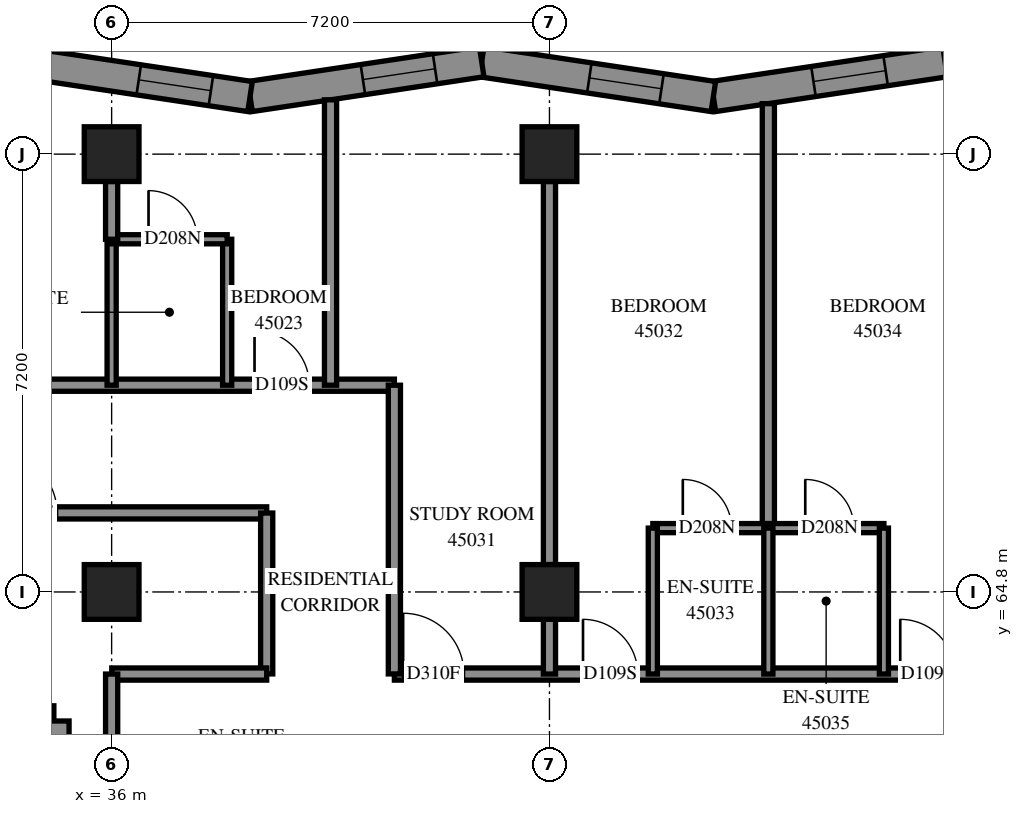
"""IFC4 building model, lengths in metres.
Left out: names, types, materials, properties, quantities, classifications, styles, units other than length and angle.
Written with IfcOpenShell. Run it as: python <this file> out.ifc"""

import sys

from ifc_helpers import new_model, si_unit, direction, frame, frame_2d, origin, origin_2d, place, context, subcontext, project, spatial, polyline, rectangle, outline, extrude, element, fill, save


model = new_model("IFC4")
c1 = context("Model", 3, precision=1e-05, world=origin(), true_north=direction((0.0, 1.0)))
c2 = subcontext(c1, "Body", "Model", "MODEL_VIEW")
j1 = project(units=[si_unit("LENGTHUNIT", "METRE"), si_unit("PLANEANGLEUNIT", "RADIAN")], contexts=[c1])
p1 = place(None, origin())
s1 = spatial("IfcSite", under=j1, at=p1, CompositionType="ELEMENT")
p2 = place(p1, origin())
s2 = spatial("IfcBuilding", under=s1, at=p2, CompositionType="ELEMENT")
p3 = place(p2, frame((0.0, 0.0, 166.0)))
s3 = spatial("IfcBuildingStorey", under=s2, at=p3, CompositionType="ELEMENT", Elevation=166.0)
for number, where, z_axis, x_axis in (
    (1, (36.0, 64.8, 0.0), (0.0, 0.0, 1.0), (1.0, 0.0, 0.0)),
    (2, (36.0, 72.0, 0.0), (0.0, 0.0, 1.0), (1.0, 0.0, 0.0)),
    (3, (43.2, 64.8, 0.0), (0.0, 0.0, 1.0), (1.0, 0.0, 0.0)),
    (4, (43.2, 72.0, 0.0), (0.0, 0.0, 1.0), (1.0, 0.0, 0.0)),
):
    element("IfcColumn", number, at=place(p3, frame(where, z_axis=z_axis, x_axis=x_axis)), inside=s3, PredefinedType="COLUMN", context=c2, shape_type="SweptSolid", body=[
        extrude(rectangle(XDim=0.9, YDim=0.9, at=origin_2d()), origin(), (0.0, 0.0, 1.0), 3.1),
    ])
p4 = place(p3, frame((49.705, 73.519, 0.0), z_axis=(0.0, 0.0, 1.0), x_axis=(-0.9889155896, -0.1484788086, 0.0)))
e5 = element("IfcWall", 5, at=p4, inside=s3, PredefinedType="SOLIDWALL", context=c2, shape_type="SweptSolid", body=[
    extrude(outline(polyline([(-0.037, -0.25), (3.815, -0.25), (3.89, 0.25), (0.037, 0.25), (-0.037, -0.25)])), origin(), (0.0, 0.0, 1.0), 3.1),
])
p5 = place(p4, frame((0.988, 0.0, 0.45)))
e6 = element("IfcOpeningElement", 6, at=p5, cuts=e5, PredefinedType="OPENING", context=c2, shape_type="SweptSolid", body=[
    extrude(rectangle(XDim=1.2, YDim=2.5, at=frame_2d((0.6, 1.25))), frame((0.0, 0.26, 0.0), z_axis=(0.0, -1.0, 0.0), x_axis=(1.0, 0.0, 0.0)), (0.0, 0.0, 1.0), 0.52),
])
p6 = place(p3, frame((45.896, 72.947, 0.0), z_axis=(0.0, 0.0, 1.0), x_axis=(-0.9889150173, 0.1484826202, 0.0)))
e7 = element("IfcWall", 7, at=p6, inside=s3, PredefinedType="SOLIDWALL", context=c2, shape_type="SweptSolid", body=[
    extrude(outline(polyline([(0.037, -0.25), (3.89, -0.25), (3.815, 0.25), (-0.037, 0.25), (0.037, -0.25)])), origin(), (0.0, 0.0, 1.0), 3.1),
])
p7 = place(p6, frame((0.863, 0.0, 0.45)))
e8 = element("IfcOpeningElement", 8, at=p7, cuts=e7, PredefinedType="OPENING", context=c2, shape_type="SweptSolid", body=[
    extrude(rectangle(XDim=1.2, YDim=2.5, at=frame_2d((0.6, 1.25))), frame((0.0, 0.26, 0.0), z_axis=(0.0, -1.0, 0.0), x_axis=(1.0, 0.0, 0.0)), (0.0, 0.0, 1.0), 0.52),
])
p8 = place(p3, frame((42.086, 73.519, 0.0), z_axis=(0.0, 0.0, 1.0), x_axis=(-0.9889155896, -0.1484788086, 0.0)))
e9 = element("IfcWall", 9, at=p8, inside=s3, PredefinedType="SOLIDWALL", context=c2, shape_type="SweptSolid", body=[
    extrude(outline(polyline([(-0.037, -0.25), (3.815, -0.25), (3.89, 0.25), (0.037, 0.25), (-0.037, -0.25)])), origin(), (0.0, 0.0, 1.0), 3.1),
])
p9 = place(p8, frame((0.776, 0.0, 0.45)))
e10 = element("IfcOpeningElement", 10, at=p9, cuts=e9, PredefinedType="OPENING", context=c2, shape_type="SweptSolid", body=[
    extrude(rectangle(XDim=1.2, YDim=2.5, at=frame_2d((0.6, 1.25))), frame((0.0, 0.26, 0.0), z_axis=(0.0, -1.0, 0.0), x_axis=(1.0, 0.0, 0.0)), (0.0, 0.0, 1.0), 0.52),
])
p10 = place(p3, frame((38.276, 72.947, 0.0), z_axis=(0.0, 0.0, 1.0), x_axis=(-0.9889155896, 0.1484788086, 0.0)))
e11 = element("IfcWall", 11, at=p10, inside=s3, PredefinedType="SOLIDWALL", context=c2, shape_type="SweptSolid", body=[
    extrude(outline(polyline([(0.037, -0.25), (3.89, -0.25), (3.815, 0.25), (-0.037, 0.25), (0.037, -0.25)])), origin(), (0.0, 0.0, 1.0), 3.1),
])
p11 = place(p10, frame((0.651, 0.0, 0.45)))
e12 = element("IfcOpeningElement", 12, at=p11, cuts=e11, PredefinedType="OPENING", context=c2, shape_type="SweptSolid", body=[
    extrude(rectangle(XDim=1.2, YDim=2.5, at=frame_2d((0.6, 1.25))), frame((0.0, 0.26, 0.0), z_axis=(0.0, -1.0, 0.0), x_axis=(1.0, 0.0, 0.0)), (0.0, 0.0, 1.0), 0.52),
])
p12 = place(p3, frame((19.478, 62.678, 0.0), z_axis=(0.0, 0.0, 1.0), x_axis=(1.0, 0.0, 0.0)))
e13 = element("IfcWall", 13, at=p12, inside=s3, PredefinedType="SOLIDWALL", context=c2, shape_type="SweptSolid", body=[
    extrude(outline(polyline([(-0.25, -0.25), (15.322, -0.25), (15.822, 0.25), (0.25, 0.25), (-0.25, -0.25)])), origin(), (0.0, 0.0, 1.0), 3.1),
])
p13 = place(p12, frame((2.522, 0.0, 0.45)))
e14 = element("IfcOpeningElement", 14, at=p13, cuts=e13, PredefinedType="OPENING", context=c2, shape_type="SweptSolid", body=[
    extrude(rectangle(XDim=2.8, YDim=2.5, at=frame_2d((1.4, 1.25))), frame((0.0, 0.26, 0.0), z_axis=(0.0, -1.0, 0.0), x_axis=(1.0, 0.0, 0.0)), (0.0, 0.0, 1.0), 0.52),
])
p14 = place(p12, frame((6.122, 0.0, 0.45)))
e15 = element("IfcOpeningElement", 15, at=p14, cuts=e13, PredefinedType="OPENING", context=c2, shape_type="SweptSolid", body=[
    extrude(rectangle(XDim=2.8, YDim=2.5, at=frame_2d((1.4, 1.25))), frame((0.0, 0.26, 0.0), z_axis=(0.0, -1.0, 0.0), x_axis=(1.0, 0.0, 0.0)), (0.0, 0.0, 1.0), 0.52),
])
p15 = place(p12, frame((0.686, 0.0, 0.45)))
e16 = element("IfcOpeningElement", 16, at=p15, cuts=e13, PredefinedType="OPENING", context=c2, shape_type="SweptSolid", body=[
    extrude(rectangle(XDim=1.2, YDim=2.5, at=frame_2d((0.6, 1.25))), frame((0.0, 0.26, 0.0), z_axis=(0.0, -1.0, 0.0), x_axis=(1.0, 0.0, 0.0)), (0.0, 0.0, 1.0), 0.52),
])
p16 = place(p12, frame((13.547, 0.0, 0.45)))
e17 = element("IfcOpeningElement", 17, at=p16, cuts=e13, PredefinedType="OPENING", context=c2, shape_type="SweptSolid", body=[
    extrude(rectangle(XDim=1.2, YDim=2.5, at=frame_2d((0.6, 1.25))), frame((0.0, 0.26, 0.0), z_axis=(0.0, -1.0, 0.0), x_axis=(1.0, 0.0, 0.0)), (0.0, 0.0, 1.0), 0.52),
])
p17 = place(p12, frame((9.547, 0.0, 0.45)))
e18 = element("IfcOpeningElement", 18, at=p17, cuts=e13, PredefinedType="OPENING", context=c2, shape_type="SweptSolid", body=[
    extrude(rectangle(XDim=1.3, YDim=2.5, at=frame_2d((0.65, 1.25))), frame((0.0, 0.26, 0.0), z_axis=(0.0, -1.0, 0.0), x_axis=(1.0, 0.0, 0.0)), (0.0, 0.0, 1.0), 0.52),
])
p18 = place(p12, frame((11.197, 0.0, 0.45)))
e19 = element("IfcOpeningElement", 19, at=p18, cuts=e13, PredefinedType="OPENING", context=c2, shape_type="SweptSolid", body=[
    extrude(rectangle(XDim=1.0, YDim=2.5, at=frame_2d((0.5, 1.25))), frame((0.0, 0.26, 0.0), z_axis=(0.0, -1.0, 0.0), x_axis=(1.0, 0.0, 0.0)), (0.0, 0.0, 1.0), 0.52),
])
p19 = place(p3, frame((35.05, 62.678, 0.0), z_axis=(0.0, 0.0, 1.0), x_axis=(0.0, -1.0, 0.0)))
e20 = element("IfcWall", 20, at=p19, inside=s3, PredefinedType="SOLIDWALL", context=c2, shape_type="SweptSolid", body=[
    extrude(outline(polyline([(0.25, -0.25), (6.278, -0.25), (5.778, 0.25), (-0.25, 0.25), (0.25, -0.25)])), origin(), (0.0, 0.0, 1.0), 3.1),
])
p20 = place(p19, frame((2.103, 0.0, 0.45)))
e21 = element("IfcOpeningElement", 21, at=p20, cuts=e20, PredefinedType="OPENING", context=c2, shape_type="SweptSolid", body=[
    extrude(rectangle(XDim=1.3, YDim=2.5, at=frame_2d((0.65, 1.25))), frame((0.0, 0.26, 0.0), z_axis=(0.0, -1.0, 0.0), x_axis=(1.0, 0.0, 0.0)), (0.0, 0.0, 1.0), 0.52),
])
p21 = place(p19, frame((3.853, 0.0, 0.45)))
e22 = element("IfcOpeningElement", 22, at=p21, cuts=e20, PredefinedType="OPENING", context=c2, shape_type="SweptSolid", body=[
    extrude(rectangle(XDim=0.8, YDim=2.5, at=frame_2d((0.4, 1.25))), frame((0.0, 0.26, 0.0), z_axis=(0.0, -1.0, 0.0), x_axis=(1.0, 0.0, 0.0)), (0.0, 0.0, 1.0), 0.52),
])
p22 = place(p3, frame((21.602, 68.2, 0.0), z_axis=(0.0, 0.0, 1.0), x_axis=(1.0, 0.0, 0.0)))
e23 = element("IfcWall", 23, at=p22, inside=s3, PredefinedType="PARTITIONING", context=c2, shape_type="SweptSolid", body=[
    extrude(rectangle(XDim=19.048, YDim=0.2, at=frame_2d((9.524, 0.0))), origin(), (0.0, 0.0, 1.0), 3.1),
])
p23 = place(p22, frame((3.998, 0.0, 0.0)))
e24 = element("IfcOpeningElement", 24, at=p23, cuts=e23, PredefinedType="OPENING", context=c2, shape_type="SweptSolid", body=[
    extrude(rectangle(XDim=0.9, YDim=2.1, at=frame_2d((0.45, 1.05))), frame((0.0, 0.11, 0.0), z_axis=(0.0, -1.0, 0.0), x_axis=(1.0, 0.0, 0.0)), (0.0, 0.0, 1.0), 0.22),
])
p24 = place(p22, frame((11.084, 0.0, 0.0)))
e25 = element("IfcOpeningElement", 25, at=p24, cuts=e23, PredefinedType="OPENING", context=c2, shape_type="SweptSolid", body=[
    extrude(rectangle(XDim=1.0, YDim=2.1, at=frame_2d((0.5, 1.05))), frame((0.0, 0.11, 0.0), z_axis=(0.0, -1.0, 0.0), x_axis=(1.0, 0.0, 0.0)), (0.0, 0.0, 1.0), 0.22),
])
p25 = place(p22, frame((16.748, 0.0, 0.0)))
e26 = element("IfcOpeningElement", 26, at=p25, cuts=e23, PredefinedType="OPENING", context=c2, shape_type="SweptSolid", body=[
    extrude(rectangle(XDim=0.9, YDim=2.1, at=frame_2d((0.45, 1.05))), frame((0.0, 0.11, 0.0), z_axis=(0.0, -1.0, 0.0), x_axis=(1.0, 0.0, 0.0)), (0.0, 0.0, 1.0), 0.22),
])
p26 = place(p3, frame((21.6, 66.1, 0.0), z_axis=(0.0, 0.0, 1.0), x_axis=(1.0, 0.0, 0.0)))
e27 = element("IfcWall", 27, at=p26, inside=s3, PredefinedType="PARTITIONING", context=c2, shape_type="SweptSolid", body=[
    extrude(rectangle(XDim=16.95, YDim=0.2, at=frame_2d((8.475, 0.0))), origin(), (0.0, 0.0, 1.0), 3.1),
])
p27 = place(p26, frame((0.546, 0.0, 0.0)))
e28 = element("IfcOpeningElement", 28, at=p27, cuts=e27, PredefinedType="OPENING", context=c2, shape_type="SweptSolid", body=[
    extrude(rectangle(XDim=0.9, YDim=2.1, at=frame_2d((0.45, 1.05))), frame((0.0, 0.11, 0.0), z_axis=(0.0, -1.0, 0.0), x_axis=(1.0, 0.0, 0.0)), (0.0, 0.0, 1.0), 0.22),
])
p28 = place(p26, frame((12.502, 0.0, 0.0)))
e29 = element("IfcOpeningElement", 29, at=p28, cuts=e27, PredefinedType="OPENING", context=c2, shape_type="SweptSolid", body=[
    extrude(rectangle(XDim=1.0, YDim=2.1, at=frame_2d((0.5, 1.05))), frame((0.0, 0.11, 0.0), z_axis=(0.0, -1.0, 0.0), x_axis=(1.0, 0.0, 0.0)), (0.0, 0.0, 1.0), 0.22),
])
p29 = place(p3, frame((40.65, 63.45, 0.0), z_axis=(0.0, 0.0, 1.0), x_axis=(1.0, 0.0, 0.0)))
e30 = element("IfcWall", 30, at=p29, inside=s3, PredefinedType="PARTITIONING", context=c2, shape_type="SweptSolid", body=[
    extrude(rectangle(XDim=9.75, YDim=0.2, at=frame_2d((4.875, 0.0))), origin(), (0.0, 0.0, 1.0), 3.1),
])
p30 = place(p29, frame((0.144, 0.0, 0.0)))
e31 = element("IfcOpeningElement", 31, at=p30, cuts=e30, PredefinedType="OPENING", context=c2, shape_type="SweptSolid", body=[
    extrude(rectangle(XDim=1.0, YDim=2.1, at=frame_2d((0.5, 1.05))), frame((0.0, 0.11, 0.0), z_axis=(0.0, -1.0, 0.0), x_axis=(1.0, 0.0, 0.0)), (0.0, 0.0, 1.0), 0.22),
])
p31 = place(p29, frame((3.102, 0.0, 0.0)))
e32 = element("IfcOpeningElement", 32, at=p31, cuts=e30, PredefinedType="OPENING", context=c2, shape_type="SweptSolid", body=[
    extrude(rectangle(XDim=0.9, YDim=2.1, at=frame_2d((0.45, 1.05))), frame((0.0, 0.11, 0.0), z_axis=(0.0, -1.0, 0.0), x_axis=(1.0, 0.0, 0.0)), (0.0, 0.0, 1.0), 0.22),
])
p32 = place(p29, frame((8.319, 0.0, 0.0)))
e33 = element("IfcOpeningElement", 33, at=p32, cuts=e30, PredefinedType="OPENING", context=c2, shape_type="SweptSolid", body=[
    extrude(rectangle(XDim=0.9, YDim=2.1, at=frame_2d((0.45, 1.05))), frame((0.0, 0.11, 0.0), z_axis=(0.0, -1.0, 0.0), x_axis=(1.0, 0.0, 0.0)), (0.0, 0.0, 1.0), 0.22),
])
p33 = place(p3, frame((46.8, 65.85, 0.0), z_axis=(0.0, 0.0, 1.0), x_axis=(0.0, 1.0, 0.0)))
e34 = element("IfcWall", 34, at=p33, inside=s3, PredefinedType="PARTITIONING", context=c2, shape_type="SweptSolid", body=[
    extrude(rectangle(XDim=6.98, YDim=0.2, at=frame_2d((3.49, 0.0))), origin(), (0.0, 0.0, 1.0), 3.1),
])
p34 = place(p3, frame((43.2, 65.25, 0.0), z_axis=(0.0, 0.0, 1.0), x_axis=(0.0, 1.0, 0.0)))
e35 = element("IfcWall", 35, at=p34, inside=s3, PredefinedType="PARTITIONING", context=c2, shape_type="SweptSolid", body=[
    extrude(rectangle(XDim=6.3, YDim=0.2, at=frame_2d((3.15, 0.0))), origin(), (0.0, 0.0, 1.0), 3.1),
])
p35 = place(p3, frame((40.65, 63.452, 0.0), z_axis=(0.0, 0.0, 1.0), x_axis=(0.0, 1.0, 0.0)))
e36 = element("IfcWall", 36, at=p35, inside=s3, PredefinedType="PARTITIONING", context=c2, shape_type="SweptSolid", body=[
    extrude(rectangle(XDim=4.748, YDim=0.2, at=frame_2d((2.374, 0.0))), origin(), (0.0, 0.0, 1.0), 3.1),
])
p36 = place(p3, frame((39.6, 68.2, 0.0), z_axis=(0.0, 0.0, 1.0), x_axis=(0.0, 1.0, 0.0)))
e37 = element("IfcWall", 37, at=p36, inside=s3, PredefinedType="PARTITIONING", context=c2, shape_type="SweptSolid", body=[
    extrude(rectangle(XDim=4.693, YDim=0.2, at=frame_2d((2.347, 0.0))), origin(), (0.0, 0.0, 1.0), 3.1),
])
p37 = place(p3, frame((44.9, 65.85, 0.0), z_axis=(0.0, 0.0, 1.0), x_axis=(1.0, 0.0, 0.0)))
e38 = element("IfcWall", 38, at=p37, inside=s3, PredefinedType="PARTITIONING", context=c2, shape_type="SweptSolid", body=[
    extrude(rectangle(XDim=3.8, YDim=0.15, at=frame_2d((1.9, 0.0))), origin(), (0.0, 0.0, 1.0), 3.1),
])
p38 = place(p37, frame((0.493, 0.0, 0.0)))
e39 = element("IfcOpeningElement", 39, at=p38, cuts=e38, PredefinedType="OPENING", context=c2, shape_type="SweptSolid", body=[
    extrude(rectangle(XDim=0.8, YDim=2.1, at=frame_2d((0.4, 1.05))), frame((0.0, 0.085, 0.0), z_axis=(0.0, -1.0, 0.0), x_axis=(1.0, 0.0, 0.0)), (0.0, 0.0, 1.0), 0.17),
])
p39 = place(p37, frame((2.507, 0.0, 0.0)))
e40 = element("IfcOpeningElement", 40, at=p39, cuts=e38, PredefinedType="OPENING", context=c2, shape_type="SweptSolid", body=[
    extrude(rectangle(XDim=0.8, YDim=2.1, at=frame_2d((0.4, 1.05))), frame((0.0, 0.085, 0.0), z_axis=(0.0, -1.0, 0.0), x_axis=(1.0, 0.0, 0.0)), (0.0, 0.0, 1.0), 0.17),
])
p40 = place(p3, frame((38.55, 63.452, 0.0), z_axis=(0.0, 0.0, 1.0), x_axis=(0.0, 1.0, 0.0)))
e41 = element("IfcWall", 41, at=p40, inside=s3, PredefinedType="PARTITIONING", context=c2, shape_type="SweptSolid", body=[
    extrude(rectangle(XDim=2.646, YDim=0.2, at=frame_2d((1.323, 0.0))), origin(), (0.0, 0.0, 1.0), 3.1),
])
p41 = place(p3, frame((36.002, 63.45, 0.0), z_axis=(0.0, 0.0, 1.0), x_axis=(1.0, 0.0, 0.0)))
e42 = element("IfcWall", 42, at=p41, inside=s3, PredefinedType="PARTITIONING", context=c2, shape_type="SweptSolid", body=[
    extrude(rectangle(XDim=2.548, YDim=0.2, at=frame_2d((1.274, 0.0))), origin(), (0.0, 0.0, 1.0), 3.1),
])
for number, where, z_axis, x_axis in (
    (43, (37.9, 68.2, 0.0), (0.0, 0.0, 1.0), (0.0, 1.0, 0.0)),
    (44, (36.0, 68.2, 0.0), (0.0, 0.0, 1.0), (0.0, 1.0, 0.0)),
    (45, (44.9, 63.45, 0.0), (0.0, 0.0, 1.0), (0.0, 1.0, 0.0)),
    (46, (46.8, 63.45, 0.0), (0.0, 0.0, 1.0), (0.0, 1.0, 0.0)),
    (47, (48.7, 63.45, 0.0), (0.0, 0.0, 1.0), (0.0, 1.0, 0.0)),
):
    element("IfcWall", number, at=place(p3, frame(where, z_axis=z_axis, x_axis=x_axis)), inside=s3, PredefinedType="PARTITIONING", context=c2, shape_type="SweptSolid", body=[
        extrude(rectangle(XDim=2.4, YDim=0.15, at=frame_2d((1.2, 0.0))), origin(), (0.0, 0.0, 1.0), 3.1),
    ])
p42 = place(p3, frame((36.0, 61.35, 0.0), z_axis=(0.0, 0.0, 1.0), x_axis=(0.0, 1.0, 0.0)))
e48 = element("IfcWall", 48, at=p42, inside=s3, PredefinedType="PARTITIONING", context=c2, shape_type="SweptSolid", body=[
    extrude(rectangle(XDim=2.1, YDim=0.2, at=frame_2d((1.05, 0.0))), origin(), (0.0, 0.0, 1.0), 2.6),
])
p43 = place(p3, frame((36.0, 70.6, 0.0), z_axis=(0.0, 0.0, 1.0), x_axis=(1.0, 0.0, 0.0)))
e49 = element("IfcWall", 49, at=p43, inside=s3, PredefinedType="PARTITIONING", context=c2, shape_type="SweptSolid", body=[
    extrude(rectangle(XDim=1.9, YDim=0.15, at=frame_2d((0.95, 0.0))), origin(), (0.0, 0.0, 1.0), 3.1),
])
p44 = place(p43, frame((0.607, 0.0, 0.0)))
e50 = element("IfcOpeningElement", 50, at=p44, cuts=e49, PredefinedType="OPENING", context=c2, shape_type="SweptSolid", body=[
    extrude(rectangle(XDim=0.8, YDim=2.1, at=frame_2d((0.4, 1.05))), frame((0.0, 0.085, 0.0), z_axis=(0.0, -1.0, 0.0), x_axis=(1.0, 0.0, 0.0)), (0.0, 0.0, 1.0), 0.17),
])
p45 = place(p3, frame((36.0, 70.6, 0.0), z_axis=(0.0, 0.0, 1.0), x_axis=(0.0, 1.0, 0.0)))
e51 = element("IfcWall", 51, at=p45, inside=s3, PredefinedType="PARTITIONING", context=c2, shape_type="SweptSolid", body=[
    extrude(rectangle(XDim=0.95, YDim=0.2, at=frame_2d((0.475, 0.0))), origin(), (0.0, 0.0, 1.0), 3.1),
])
p46 = place(p3, frame((43.2, 63.45, 0.0), z_axis=(0.0, 0.0, 1.0), x_axis=(0.0, 1.0, 0.0)))
e52 = element("IfcWall", 52, at=p46, inside=s3, PredefinedType="PARTITIONING", context=c2, shape_type="SweptSolid", body=[
    extrude(rectangle(XDim=0.9, YDim=0.2, at=frame_2d((0.45, 0.0))), origin(), (0.0, 0.0, 1.0), 3.1),
])
p47 = place(p5, origin())
e53 = element("IfcWindow", 53, at=p47, inside=s3, PartitioningType="SINGLE_PANEL", PredefinedType="WINDOW", context=c2, shape_type="SweptSolid", body=[
    extrude(rectangle(XDim=1.2, YDim=2.5, at=frame_2d((0.6, 1.25))), frame((0.0, 0.18, 0.0), z_axis=(0.0, -1.0, 0.0), x_axis=(1.0, 0.0, 0.0)), (0.0, 0.0, 1.0), 0.06),
])
fill(e6, e53)
p48 = place(p7, origin())
e54 = element("IfcWindow", 54, at=p48, inside=s3, PartitioningType="SINGLE_PANEL", PredefinedType="WINDOW", context=c2, shape_type="SweptSolid", body=[
    extrude(rectangle(XDim=1.2, YDim=2.5, at=frame_2d((0.6, 1.25))), frame((0.0, 0.18, 0.0), z_axis=(0.0, -1.0, 0.0), x_axis=(1.0, 0.0, 0.0)), (0.0, 0.0, 1.0), 0.06),
])
fill(e8, e54)
p49 = place(p9, origin())
e55 = element("IfcWindow", 55, at=p49, inside=s3, PartitioningType="SINGLE_PANEL", PredefinedType="WINDOW", context=c2, shape_type="SweptSolid", body=[
    extrude(rectangle(XDim=1.2, YDim=2.5, at=frame_2d((0.6, 1.25))), frame((0.0, 0.18, 0.0), z_axis=(0.0, -1.0, 0.0), x_axis=(1.0, 0.0, 0.0)), (0.0, 0.0, 1.0), 0.06),
])
fill(e10, e55)
p50 = place(p11, origin())
e56 = element("IfcWindow", 56, at=p50, inside=s3, PartitioningType="SINGLE_PANEL", PredefinedType="WINDOW", context=c2, shape_type="SweptSolid", body=[
    extrude(rectangle(XDim=1.2, YDim=2.5, at=frame_2d((0.6, 1.25))), frame((0.0, 0.18, 0.0), z_axis=(0.0, -1.0, 0.0), x_axis=(1.0, 0.0, 0.0)), (0.0, 0.0, 1.0), 0.06),
])
fill(e12, e56)
p51 = place(p25, origin())
e57 = element("IfcDoor", 57, at=p51, inside=s3, OperationType="SINGLE_SWING_RIGHT", PredefinedType="DOOR", context=c2, shape_type="SweptSolid", body=[
    extrude(rectangle(XDim=0.9, YDim=2.1, at=frame_2d((0.45, 1.05))), frame((0.0, 0.025, 0.0), z_axis=(0.0, -1.0, 0.0), x_axis=(1.0, 0.0, 0.0)), (0.0, 0.0, 1.0), 0.05),
])
fill(e26, e57)
p52 = place(p44, origin())
e58 = element("IfcDoor", 58, at=p52, inside=s3, OperationType="SINGLE_SWING_RIGHT", PredefinedType="DOOR", context=c2, shape_type="SweptSolid", body=[
    extrude(rectangle(XDim=0.8, YDim=2.1, at=frame_2d((0.4, 1.05))), frame((0.0, 0.025, 0.0), z_axis=(0.0, -1.0, 0.0), x_axis=(1.0, 0.0, 0.0)), (0.0, 0.0, 1.0), 0.05),
])
fill(e50, e58)
p53 = place(p28, origin())
e59 = element("IfcDoor", 59, at=p53, inside=s3, OperationType="SINGLE_SWING_RIGHT", PredefinedType="DOOR", context=c2, shape_type="SweptSolid", body=[
    extrude(rectangle(XDim=1.0, YDim=2.1, at=frame_2d((0.5, 1.05))), frame((0.0, 0.025, 0.0), z_axis=(0.0, -1.0, 0.0), x_axis=(1.0, 0.0, 0.0)), (0.0, 0.0, 1.0), 0.05),
])
fill(e29, e59)
p54 = place(p30, origin())
e60 = element("IfcDoor", 60, at=p54, inside=s3, OperationType="SINGLE_SWING_LEFT", PredefinedType="DOOR", context=c2, shape_type="SweptSolid", body=[
    extrude(rectangle(XDim=1.0, YDim=2.1, at=frame_2d((0.5, 1.05))), frame((0.0, 0.025, 0.0), z_axis=(0.0, -1.0, 0.0), x_axis=(1.0, 0.0, 0.0)), (0.0, 0.0, 1.0), 0.05),
])
fill(e31, e60)
p55 = place(p31, origin())
e61 = element("IfcDoor", 61, at=p55, inside=s3, OperationType="SINGLE_SWING_RIGHT", PredefinedType="DOOR", context=c2, shape_type="SweptSolid", body=[
    extrude(rectangle(XDim=0.9, YDim=2.1, at=frame_2d((0.45, 1.05))), frame((0.0, 0.025, 0.0), z_axis=(0.0, -1.0, 0.0), x_axis=(1.0, 0.0, 0.0)), (0.0, 0.0, 1.0), 0.05),
])
fill(e32, e61)
p56 = place(p38, origin())
e62 = element("IfcDoor", 62, at=p56, inside=s3, OperationType="SINGLE_SWING_RIGHT", PredefinedType="DOOR", context=c2, shape_type="SweptSolid", body=[
    extrude(rectangle(XDim=0.8, YDim=2.1, at=frame_2d((0.4, 1.05))), frame((0.0, 0.025, 0.0), z_axis=(0.0, -1.0, 0.0), x_axis=(1.0, 0.0, 0.0)), (0.0, 0.0, 1.0), 0.05),
])
fill(e39, e62)
p57 = place(p32, origin())
e63 = element("IfcDoor", 63, at=p57, inside=s3, OperationType="SINGLE_SWING_LEFT", PredefinedType="DOOR", context=c2, shape_type="SweptSolid", body=[
    extrude(rectangle(XDim=0.9, YDim=2.1, at=frame_2d((0.45, 1.05))), frame((0.0, 0.025, 0.0), z_axis=(0.0, -1.0, 0.0), x_axis=(1.0, 0.0, 0.0)), (0.0, 0.0, 1.0), 0.05),
])
fill(e33, e63)
p58 = place(p39, origin())
e64 = element("IfcDoor", 64, at=p58, inside=s3, OperationType="SINGLE_SWING_RIGHT", PredefinedType="DOOR", context=c2, shape_type="SweptSolid", body=[
    extrude(rectangle(XDim=0.8, YDim=2.1, at=frame_2d((0.4, 1.05))), frame((0.0, 0.025, 0.0), z_axis=(0.0, -1.0, 0.0), x_axis=(1.0, 0.0, 0.0)), (0.0, 0.0, 1.0), 0.05),
])
fill(e40, e64)
save(model, sys.argv[1])
